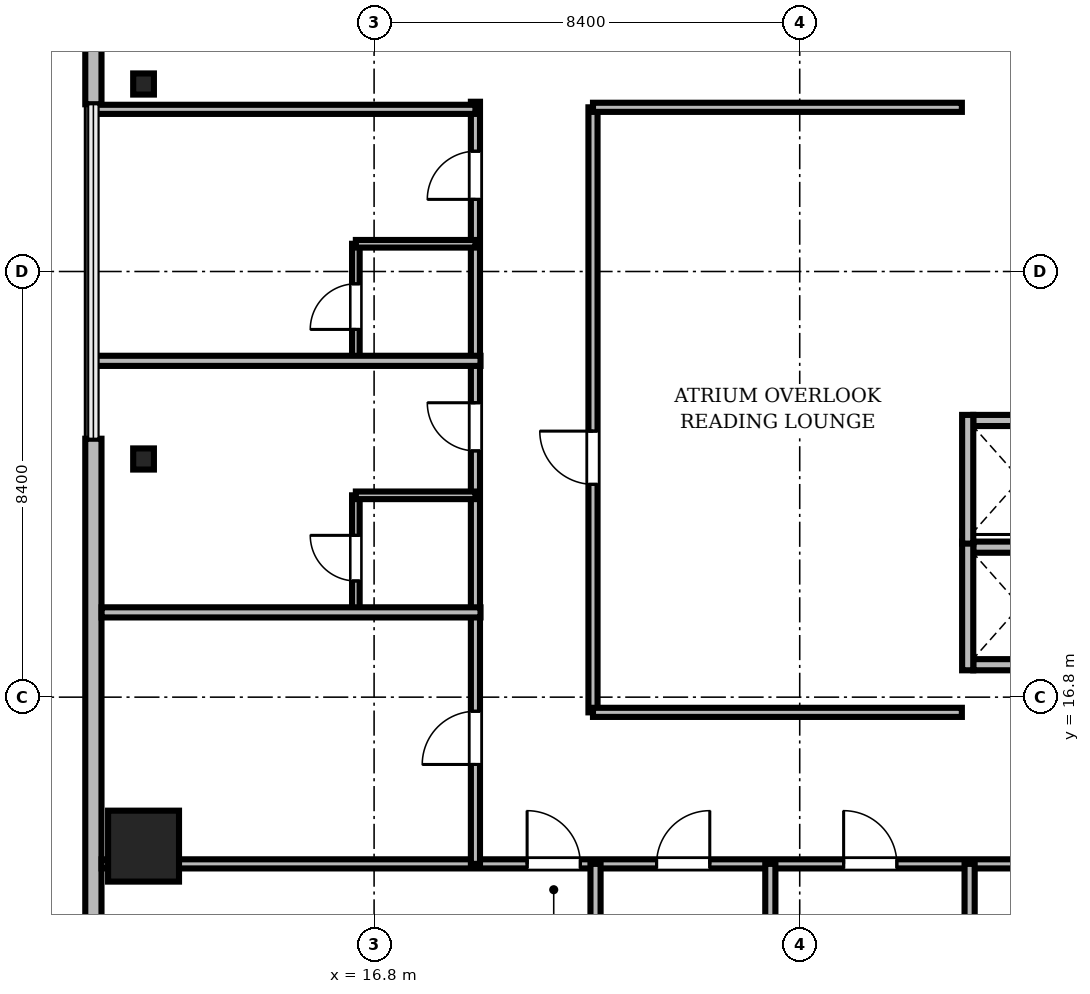
"""IFC4 building model, lengths in metres.
Left out: names, types, materials, properties, quantities, classifications, styles, units other than length and angle.
Written with IfcOpenShell. Run it as: python <this file> out.ifc"""

import sys

from ifc_helpers import new_model, si_unit, direction, frame, frame_2d, origin, origin_2d, place, context, subcontext, project, spatial, rectangle, i_section, extrude, source, transform, mapped, element, fill, save


model = new_model("IFC4")
c1 = context("Model", 3, precision=1e-05, world=origin(), true_north=direction((0.0, 1.0)))
c2 = subcontext(c1, "Body", "Model", "MODEL_VIEW")
j1 = project(units=[si_unit("LENGTHUNIT", "METRE"), si_unit("PLANEANGLEUNIT", "RADIAN")], contexts=[c1])
p1 = place(None, origin())
s1 = spatial("IfcSite", under=j1, at=p1, CompositionType="ELEMENT")
p2 = place(p1, origin())
s2 = spatial("IfcBuilding", under=s1, at=p2, CompositionType="ELEMENT")
p3 = place(p2, frame((0.0, 0.0, 211.05)))
s3 = spatial("IfcBuildingStorey", under=s2, at=p3, CompositionType="ELEMENT", Elevation=211.05)
m1 = source(origin(), c2, "Body", "SweptSolid", [
    extrude(rectangle(XDim=1.4, YDim=1.4, at=origin_2d()), origin(), (0.0, 0.0, 1.0), 3.53),
])
p4 = place(p3, frame((12.25, 13.86, 0.0), z_axis=(0.0, 0.0, 1.0), x_axis=(1.0, 0.0, 0.0)))
e1 = element("IfcColumn", 1, at=p4, inside=s3, PredefinedType="COLUMN", context=c2, shape_type="MappedRepresentation", body=[
    mapped(m1, transform((0.0, 0.0, 0.0), scale=1.0)),
])
m2 = source(origin(), c2, "Body", "SweptSolid", [
    extrude(i_section(OverallWidth=0.409, OverallDepth=0.417, WebThickness=0.021, FlangeThickness=0.033, FilletRadius=0.015, at=origin_2d()), origin(), (0.0, 0.0, 1.0), 3.53),
])
for number, where, z_axis, x_axis in (
    (2, (12.25, 28.9, 0.0), (0.0, 0.0, 1.0), (1.0, 0.0, 0.0)),
    (3, (12.25, 21.5, 0.0), (0.0, 0.0, 1.0), (1.0, 0.0, 0.0)),
):
    element("IfcColumn", number, at=place(p3, frame(where, z_axis=z_axis, x_axis=x_axis)), inside=s3, PredefinedType="COLUMN", context=c2, shape_type="MappedRepresentation", body=[
        mapped(m2, transform((0.0, 0.0, 0.0), scale=1.0)),
    ])
m3 = source(origin(), c2, "Body", "SweptSolid", [
    extrude(rectangle(XDim=15.6, YDim=0.32, at=frame_2d((7.8, 0.0))), origin(), (0.0, 0.0, 1.0), 3.53),
])
p5 = place(p3, frame((11.26, 44.1, 0.0), z_axis=(0.0, 0.0, 1.0), x_axis=(0.0, -1.0, 0.0)))
e4 = element("IfcWall", 4, at=p5, inside=s3, PredefinedType="SOLIDWALL", context=c2, shape_type="MappedRepresentation", body=[
    mapped(m3, transform((0.0, 0.0, 0.0), scale=1.0)),
])
m4 = source(origin(), c2, "Body", "SweptSolid", [
    extrude(rectangle(XDim=1.4, YDim=2.3, at=frame_2d((0.7, 1.15))), frame((0.0, 0.17, 0.0), z_axis=(0.0, -1.0, 0.0), x_axis=(1.0, 0.0, 0.0)), (0.0, 0.0, 1.0), 0.34),
])
p6 = place(p5, frame((9.61, 0.0, 0.0)))
e5 = element("IfcOpeningElement", 5, at=p6, cuts=e4, PredefinedType="OPENING", context=c2, shape_type="MappedRepresentation", body=[
    mapped(m4, transform((0.0, 0.0, 0.0), scale=1.0)),
])
m5 = source(origin(), c2, "Body", "SweptSolid", [
    extrude(rectangle(XDim=2.8, YDim=2.4, at=frame_2d((1.4, 1.2))), frame((0.0, 0.17, 0.0), z_axis=(0.0, -1.0, 0.0), x_axis=(1.0, 0.0, 0.0)), (0.0, 0.0, 1.0), 0.34),
])
p7 = place(p5, frame((2.705, 0.0, 0.72)))
e6 = element("IfcOpeningElement", 6, at=p7, cuts=e4, PredefinedType="OPENING", context=c2, shape_type="MappedRepresentation", body=[
    mapped(m5, transform((0.0, 0.0, 0.0), scale=1.0)),
])
m6 = source(origin(), c2, "Body", "SweptSolid", [
    extrude(rectangle(XDim=15.6, YDim=0.32, at=frame_2d((7.8, 0.0))), origin(), (0.0, 0.0, 1.0), 3.53),
])
p8 = place(p3, frame((11.26, 21.9, 0.0), z_axis=(0.0, 0.0, 1.0), x_axis=(0.0, -1.0, 0.0)))
e7 = element("IfcWall", 7, at=p8, inside=s3, PredefinedType="SOLIDWALL", context=c2, shape_type="MappedRepresentation", body=[
    mapped(m6, transform((0.0, 0.0, 0.0), scale=1.0)),
])
p9 = place(p8, frame((10.095, 0.0, 0.72)))
e8 = element("IfcOpeningElement", 8, at=p9, cuts=e7, PredefinedType="OPENING", context=c2, shape_type="MappedRepresentation", body=[
    mapped(m5, transform((0.0, 0.0, 0.0), scale=1.0)),
])
m7 = source(origin(), c2, "Body", "SweptSolid", [
    extrude(rectangle(XDim=1.85, YDim=0.22, at=frame_2d((0.925, 0.0))), origin(), (0.0, 0.0, 1.0), 2.972),
])
p10 = place(p3, frame((28.625, 17.44, 0.0), z_axis=(0.0, 0.0, 1.0), x_axis=(1.0, 0.0, 0.0)))
e9 = element("IfcWall", 9, at=p10, inside=s3, PredefinedType="SOLIDWALL", context=c2, shape_type="MappedRepresentation", body=[
    mapped(m7, transform((0.0, 0.0, 0.0), scale=1.0)),
])
m8 = source(origin(), c2, "Body", "SweptSolid", [
    extrude(rectangle(XDim=1.85, YDim=0.22, at=frame_2d((0.925, 0.0))), origin(), (0.0, 0.0, 1.0), 3.53),
])
p11 = place(p3, frame((28.625, 19.76, 0.0), z_axis=(0.0, 0.0, 1.0), x_axis=(1.0, 0.0, 0.0)))
e10 = element("IfcWall", 10, at=p11, inside=s3, PredefinedType="SOLIDWALL", context=c2, shape_type="MappedRepresentation", body=[
    mapped(m8, transform((0.0, 0.0, 0.0), scale=1.0)),
])
m9 = source(origin(), c2, "Body", "SweptSolid", [
    extrude(rectangle(XDim=2.54, YDim=0.22, at=frame_2d((1.27, 0.0))), origin(), (0.0, 0.0, 1.0), 2.972),
])
p12 = place(p3, frame((28.515, 17.33, 0.0), z_axis=(0.0, 0.0, 1.0), x_axis=(0.0, 1.0, 0.0)))
e11 = element("IfcWall", 11, at=p12, inside=s3, PredefinedType="SOLIDWALL", context=c2, shape_type="MappedRepresentation", body=[
    mapped(m9, transform((0.0, 0.0, 0.0), scale=1.0)),
])
p13 = place(p3, frame((28.625, 22.26, 0.0), z_axis=(0.0, 0.0, 1.0), x_axis=(1.0, 0.0, 0.0)))
e12 = element("IfcWall", 12, at=p13, inside=s3, PredefinedType="SOLIDWALL", context=c2, shape_type="MappedRepresentation", body=[
    mapped(m8, transform((0.0, 0.0, 0.0), scale=1.0)),
])
m10 = source(origin(), c2, "Body", "SweptSolid", [
    extrude(rectangle(XDim=2.54, YDim=0.22, at=frame_2d((1.27, 0.0))), origin(), (0.0, 0.0, 1.0), 3.53),
])
p14 = place(p3, frame((28.515, 19.83, 0.0), z_axis=(0.0, 0.0, 1.0), x_axis=(0.0, 1.0, 0.0)))
e13 = element("IfcWall", 13, at=p14, inside=s3, PredefinedType="SOLIDWALL", context=c2, shape_type="MappedRepresentation", body=[
    mapped(m10, transform((0.0, 0.0, 0.0), scale=1.0)),
])
m11 = source(origin(), c2, "Body", "SweptSolid", [
    extrude(rectangle(XDim=46.156, YDim=0.18, at=frame_2d((23.078, 0.0))), origin(), (0.0, 0.0, 1.0), 2.772),
])
p15 = place(p3, frame((11.422, 13.51, 0.0), z_axis=(0.0, 0.0, 1.0), x_axis=(1.0, 0.0, 0.0)))
e14 = element("IfcWall", 14, at=p15, inside=s3, PredefinedType="PARTITIONING", context=c2, shape_type="MappedRepresentation", body=[
    mapped(m11, transform((0.0, 0.0, 0.0), scale=1.0)),
])
m12 = source(origin(), c2, "Body", "SweptSolid", [
    extrude(rectangle(XDim=1.05, YDim=2.2, at=frame_2d((0.525, 1.1))), frame((0.0, 0.1, 0.0), z_axis=(0.0, -1.0, 0.0), x_axis=(1.0, 0.0, 0.0)), (0.0, 0.0, 1.0), 0.2),
])
p16 = place(p15, frame((8.398, 0.0, 0.0)))
e15 = element("IfcOpeningElement", 15, at=p16, cuts=e14, PredefinedType="OPENING", context=c2, shape_type="MappedRepresentation", body=[
    mapped(m12, transform((0.0, 0.0, 0.0), scale=1.0)),
])
p17 = place(p15, frame((10.953, 0.0, 0.0)))
e16 = element("IfcOpeningElement", 16, at=p17, cuts=e14, PredefinedType="OPENING", context=c2, shape_type="MappedRepresentation", body=[
    mapped(m12, transform((0.0, 0.0, 0.0), scale=1.0)),
])
p18 = place(p15, frame((14.645, 0.0, 0.0)))
e17 = element("IfcOpeningElement", 17, at=p18, cuts=e14, PredefinedType="OPENING", context=c2, shape_type="MappedRepresentation", body=[
    mapped(m12, transform((0.0, 0.0, 0.0), scale=1.0)),
])
m13 = source(origin(), c2, "Body", "SweptSolid", [
    extrude(rectangle(XDim=0.95, YDim=2.15, at=frame_2d((0.475, 1.075))), frame((0.0, 0.1, 0.0), z_axis=(0.0, -1.0, 0.0), x_axis=(1.0, 0.0, 0.0)), (0.0, 0.0, 1.0), 0.2),
])
p19 = place(p15, frame((20.057, 0.0, 0.0)))
e18 = element("IfcOpeningElement", 18, at=p19, cuts=e14, PredefinedType="OPENING", context=c2, shape_type="MappedRepresentation", body=[
    mapped(m13, transform((0.0, 0.0, 0.0), scale=1.0)),
])
p20 = place(p15, frame((23.274, 0.0, 0.0)))
e19 = element("IfcOpeningElement", 19, at=p20, cuts=e14, PredefinedType="OPENING", context=c2, shape_type="MappedRepresentation", body=[
    mapped(m12, transform((0.0, 0.0, 0.0), scale=1.0)),
])
p21 = place(p15, frame((27.716, 0.0, 0.0)))
e20 = element("IfcOpeningElement", 20, at=p21, cuts=e14, PredefinedType="OPENING", context=c2, shape_type="MappedRepresentation", body=[
    mapped(m12, transform((0.0, 0.0, 0.0), scale=1.0)),
])
p22 = place(p15, frame((32.907, 0.0, 0.0)))
e21 = element("IfcOpeningElement", 21, at=p22, cuts=e14, PredefinedType="OPENING", context=c2, shape_type="MappedRepresentation", body=[
    mapped(m12, transform((0.0, 0.0, 0.0), scale=1.0)),
])
p23 = place(p15, frame((37.498, 0.0, 0.0)))
e22 = element("IfcOpeningElement", 22, at=p23, cuts=e14, PredefinedType="OPENING", context=c2, shape_type="MappedRepresentation", body=[
    mapped(m12, transform((0.0, 0.0, 0.0), scale=1.0)),
])
m14 = source(origin(), c2, "Body", "SweptSolid", [
    extrude(rectangle(XDim=15.04, YDim=0.18, at=frame_2d((7.52, 0.0))), origin(), (0.0, 0.0, 1.0), 2.972),
])
p24 = place(p3, frame((18.8, 13.51, 0.0), z_axis=(0.0, 0.0, 1.0), x_axis=(0.0, 1.0, 0.0)))
e23 = element("IfcWall", 23, at=p24, inside=s3, PredefinedType="PARTITIONING", context=c2, shape_type="MappedRepresentation", body=[
    mapped(m14, transform((0.0, 0.0, 0.0), scale=1.0)),
])
p25 = place(p24, frame((1.962, 0.0, 0.0)))
e24 = element("IfcOpeningElement", 24, at=p25, cuts=e23, PredefinedType="OPENING", context=c2, shape_type="MappedRepresentation", body=[
    mapped(m12, transform((0.0, 0.0, 0.0), scale=1.0)),
])
p26 = place(p24, frame((8.15, 0.0, 0.0)))
e25 = element("IfcOpeningElement", 25, at=p26, cuts=e23, PredefinedType="OPENING", context=c2, shape_type="MappedRepresentation", body=[
    mapped(m13, transform((0.0, 0.0, 0.0), scale=1.0)),
])
p27 = place(p24, frame((13.113, 0.0, 0.0)))
e26 = element("IfcOpeningElement", 26, at=p27, cuts=e23, PredefinedType="OPENING", context=c2, shape_type="MappedRepresentation", body=[
    mapped(m13, transform((0.0, 0.0, 0.0), scale=1.0)),
])
m15 = source(origin(), c2, "Body", "SweptSolid", [
    extrude(rectangle(XDim=11.94, YDim=0.18, at=frame_2d((5.97, 0.0))), origin(), (0.0, 0.0, 1.0), 2.972),
])
p28 = place(p3, frame((21.12, 16.5, 0.0), z_axis=(0.0, 0.0, 1.0), x_axis=(0.0, 1.0, 0.0)))
e27 = element("IfcWall", 27, at=p28, inside=s3, PredefinedType="PARTITIONING", context=c2, shape_type="MappedRepresentation", body=[
    mapped(m15, transform((0.0, 0.0, 0.0), scale=1.0)),
])
p29 = place(p28, frame((4.5, 0.0, 0.0)))
e28 = element("IfcOpeningElement", 28, at=p29, cuts=e27, PredefinedType="OPENING", context=c2, shape_type="MappedRepresentation", body=[
    mapped(m12, transform((0.0, 0.0, 0.0), scale=1.0)),
])
m16 = source(origin(), c2, "Body", "SweptSolid", [
    extrude(rectangle(XDim=2.29, YDim=0.15, at=frame_2d((1.145, 0.0))), origin(), (0.0, 0.0, 1.0), 2.972),
])
p30 = place(p3, frame((16.44, 18.493, 0.0), z_axis=(0.0, 0.0, 1.0), x_axis=(0.0, 1.0, 0.0)))
e29 = element("IfcWall", 29, at=p30, inside=s3, PredefinedType="PARTITIONING", context=c2, shape_type="MappedRepresentation", body=[
    mapped(m16, transform((0.0, 0.0, 0.0), scale=1.0)),
])
m17 = source(origin(), c2, "Body", "SweptSolid", [
    extrude(rectangle(XDim=0.9, YDim=2.1, at=frame_2d((0.45, 1.05))), frame((0.0, 0.085, 0.0), z_axis=(0.0, -1.0, 0.0), x_axis=(1.0, 0.0, 0.0)), (0.0, 0.0, 1.0), 0.17),
])
p31 = place(p30, frame((0.6, 0.0, 0.0)))
e30 = element("IfcOpeningElement", 30, at=p31, cuts=e29, PredefinedType="OPENING", context=c2, shape_type="MappedRepresentation", body=[
    mapped(m17, transform((0.0, 0.0, 0.0), scale=1.0)),
])
m18 = source(origin(), c2, "Body", "SweptSolid", [
    extrude(rectangle(XDim=2.29, YDim=0.15, at=frame_2d((1.145, 0.0))), origin(), (0.0, 0.0, 1.0), 3.192),
])
p32 = place(p3, frame((16.44, 23.457, 0.0), z_axis=(0.0, 0.0, 1.0), x_axis=(0.0, 1.0, 0.0)))
e31 = element("IfcWall", 31, at=p32, inside=s3, PredefinedType="PARTITIONING", context=c2, shape_type="MappedRepresentation", body=[
    mapped(m18, transform((0.0, 0.0, 0.0), scale=1.0)),
])
p33 = place(p32, frame((0.6, 0.0, 0.0)))
e32 = element("IfcOpeningElement", 32, at=p33, cuts=e31, PredefinedType="OPENING", context=c2, shape_type="MappedRepresentation", body=[
    mapped(m17, transform((0.0, 0.0, 0.0), scale=1.0)),
])
m19 = source(origin(), c2, "Body", "SweptSolid", [
    extrude(rectangle(XDim=11.388, YDim=0.2, at=frame_2d((5.694, 0.0))), origin(), (0.0, 0.0, 1.0), 2.772),
])
for number, where, z_axis, x_axis in (
    (33, (21.17, 2.122, 0.0), (0.0, 0.0, 1.0), (0.0, 1.0, 0.0)),
    (34, (24.62, 2.122, 0.0), (0.0, 0.0, 1.0), (0.0, 1.0, 0.0)),
    (35, (28.553, 2.122, 0.0), (0.0, 0.0, 1.0), (0.0, 1.0, 0.0)),
):
    element("IfcWall", number, at=place(p3, frame(where, z_axis=z_axis, x_axis=x_axis)), inside=s3, PredefinedType="PARTITIONING", context=c2, shape_type="MappedRepresentation", body=[
        mapped(m19, transform((0.0, 0.0, 0.0), scale=1.0)),
    ])
m20 = source(origin(), c2, "Body", "SweptSolid", [
    extrude(rectangle(XDim=7.478, YDim=0.2, at=frame_2d((3.739, 0.0))), origin(), (0.0, 0.0, 1.0), 2.772),
])
p34 = place(p3, frame((11.422, 18.473, 0.0), z_axis=(0.0, 0.0, 1.0), x_axis=(1.0, 0.0, 0.0)))
e36 = element("IfcWall", 36, at=p34, inside=s3, PredefinedType="PARTITIONING", context=c2, shape_type="MappedRepresentation", body=[
    mapped(m20, transform((0.0, 0.0, 0.0), scale=1.0)),
])
m21 = source(origin(), c2, "Body", "SweptSolid", [
    extrude(rectangle(XDim=7.67, YDim=0.2, at=frame_2d((3.835, 0.0))), origin(), (0.0, 0.0, 1.0), 2.772),
])
p35 = place(p3, frame((11.23, 23.437, 0.0), z_axis=(0.0, 0.0, 1.0), x_axis=(1.0, 0.0, 0.0)))
e37 = element("IfcWall", 37, at=p35, inside=s3, PredefinedType="PARTITIONING", context=c2, shape_type="MappedRepresentation", body=[
    mapped(m21, transform((0.0, 0.0, 0.0), scale=1.0)),
])
m22 = source(origin(), c2, "Body", "SweptSolid", [
    extrude(rectangle(XDim=7.57, YDim=0.18, at=frame_2d((3.785, 0.0))), origin(), (0.0, 0.0, 1.0), 2.772),
])
p36 = place(p3, frame((11.23, 28.4, 0.0), z_axis=(0.0, 0.0, 1.0), x_axis=(1.0, 0.0, 0.0)))
e38 = element("IfcWall", 38, at=p36, inside=s3, PredefinedType="PARTITIONING", context=c2, shape_type="MappedRepresentation", body=[
    mapped(m22, transform((0.0, 0.0, 0.0), scale=1.0)),
])
m23 = source(origin(), c2, "Body", "SweptSolid", [
    extrude(rectangle(XDim=7.28, YDim=0.18, at=frame_2d((3.64, 0.0))), origin(), (0.0, 0.0, 1.0), 3.53),
])
for number, where, z_axis, x_axis in (
    (39, (21.12, 16.5, 0.0), (0.0, 0.0, 1.0), (1.0, 0.0, 0.0)),
    (40, (21.12, 28.44, 0.0), (0.0, 0.0, 1.0), (1.0, 0.0, 0.0)),
):
    element("IfcWall", number, at=place(p3, frame(where, z_axis=z_axis, x_axis=x_axis)), inside=s3, PredefinedType="PARTITIONING", context=c2, shape_type="MappedRepresentation", body=[
        mapped(m23, transform((0.0, 0.0, 0.0), scale=1.0)),
    ])
m24 = source(origin(), c2, "Body", "SweptSolid", [
    extrude(rectangle(XDim=2.36, YDim=0.15, at=frame_2d((1.18, 0.0))), origin(), (0.0, 0.0, 1.0), 3.53),
])
for number, where, z_axis, x_axis in (
    (41, (16.44, 20.783, 0.0), (0.0, 0.0, 1.0), (1.0, 0.0, 0.0)),
    (42, (16.44, 25.747, 0.0), (0.0, 0.0, 1.0), (1.0, 0.0, 0.0)),
):
    element("IfcWall", number, at=place(p3, frame(where, z_axis=z_axis, x_axis=x_axis)), inside=s3, PredefinedType="PARTITIONING", context=c2, shape_type="MappedRepresentation", body=[
        mapped(m24, transform((0.0, 0.0, 0.0), scale=1.0)),
    ])
m25 = source(origin(), c2, "Body", "SweptSolid", [
    extrude(rectangle(XDim=1.05, YDim=2.2, at=frame_2d((0.525, 1.1))), frame((0.0, 0.025, 0.0), z_axis=(0.0, -1.0, 0.0), x_axis=(1.0, 0.0, 0.0)), (0.0, 0.0, 1.0), 0.05),
])
p37 = place(p16, origin())
e43 = element("IfcDoor", 43, at=p37, inside=s3, OperationType="SINGLE_SWING_LEFT", PredefinedType="DOOR", context=c2, shape_type="MappedRepresentation", body=[
    mapped(m25, transform((0.0, 0.0, 0.0), scale=1.0)),
])
fill(e15, e43)
p38 = place(p17, origin())
e44 = element("IfcDoor", 44, at=p38, inside=s3, OperationType="SINGLE_SWING_RIGHT", PredefinedType="DOOR", context=c2, shape_type="MappedRepresentation", body=[
    mapped(m25, transform((0.0, 0.0, 0.0), scale=1.0)),
])
fill(e16, e44)
p39 = place(p18, origin())
e45 = element("IfcDoor", 45, at=p39, inside=s3, OperationType="SINGLE_SWING_LEFT", PredefinedType="DOOR", context=c2, shape_type="MappedRepresentation", body=[
    mapped(m25, transform((0.0, 0.0, 0.0), scale=1.0)),
])
fill(e17, e45)
p40 = place(p25, origin())
e46 = element("IfcDoor", 46, at=p40, inside=s3, OperationType="SINGLE_SWING_LEFT", PredefinedType="DOOR", context=c2, shape_type="MappedRepresentation", body=[
    mapped(m25, transform((0.0, 0.0, 0.0), scale=1.0)),
])
fill(e24, e46)
m26 = source(origin(), c2, "Body", "SweptSolid", [
    extrude(rectangle(XDim=0.95, YDim=2.15, at=frame_2d((0.475, 1.075))), frame((0.0, 0.025, 0.0), z_axis=(0.0, -1.0, 0.0), x_axis=(1.0, 0.0, 0.0)), (0.0, 0.0, 1.0), 0.05),
])
p41 = place(p26, origin())
e47 = element("IfcDoor", 47, at=p41, inside=s3, OperationType="SINGLE_SWING_RIGHT", PredefinedType="DOOR", context=c2, shape_type="MappedRepresentation", body=[
    mapped(m26, transform((0.0, 0.0, 0.0), scale=1.0)),
])
fill(e25, e47)
p42 = place(p27, origin())
e48 = element("IfcDoor", 48, at=p42, inside=s3, OperationType="SINGLE_SWING_LEFT", PredefinedType="DOOR", context=c2, shape_type="MappedRepresentation", body=[
    mapped(m26, transform((0.0, 0.0, 0.0), scale=1.0)),
])
fill(e26, e48)
p43 = place(p29, origin())
e49 = element("IfcDoor", 49, at=p43, inside=s3, OperationType="SINGLE_SWING_RIGHT", PredefinedType="DOOR", context=c2, shape_type="MappedRepresentation", body=[
    mapped(m25, transform((0.0, 0.0, 0.0), scale=1.0)),
])
fill(e28, e49)
m27 = source(origin(), c2, "Body", "SweptSolid", [
    extrude(rectangle(XDim=0.9, YDim=2.1, at=frame_2d((0.45, 1.05))), frame((0.0, 0.025, 0.0), z_axis=(0.0, -1.0, 0.0), x_axis=(1.0, 0.0, 0.0)), (0.0, 0.0, 1.0), 0.05),
])
p44 = place(p31, origin())
e50 = element("IfcDoor", 50, at=p44, inside=s3, OperationType="SINGLE_SWING_RIGHT", PredefinedType="DOOR", context=c2, shape_type="MappedRepresentation", body=[
    mapped(m27, transform((0.0, 0.0, 0.0), scale=1.0)),
])
fill(e30, e50)
p45 = place(p33, origin())
e51 = element("IfcDoor", 51, at=p45, inside=s3, OperationType="SINGLE_SWING_LEFT", PredefinedType="DOOR", context=c2, shape_type="MappedRepresentation", body=[
    mapped(m27, transform((0.0, 0.0, 0.0), scale=1.0)),
])
fill(e32, e51)
save(model, sys.argv[1])
